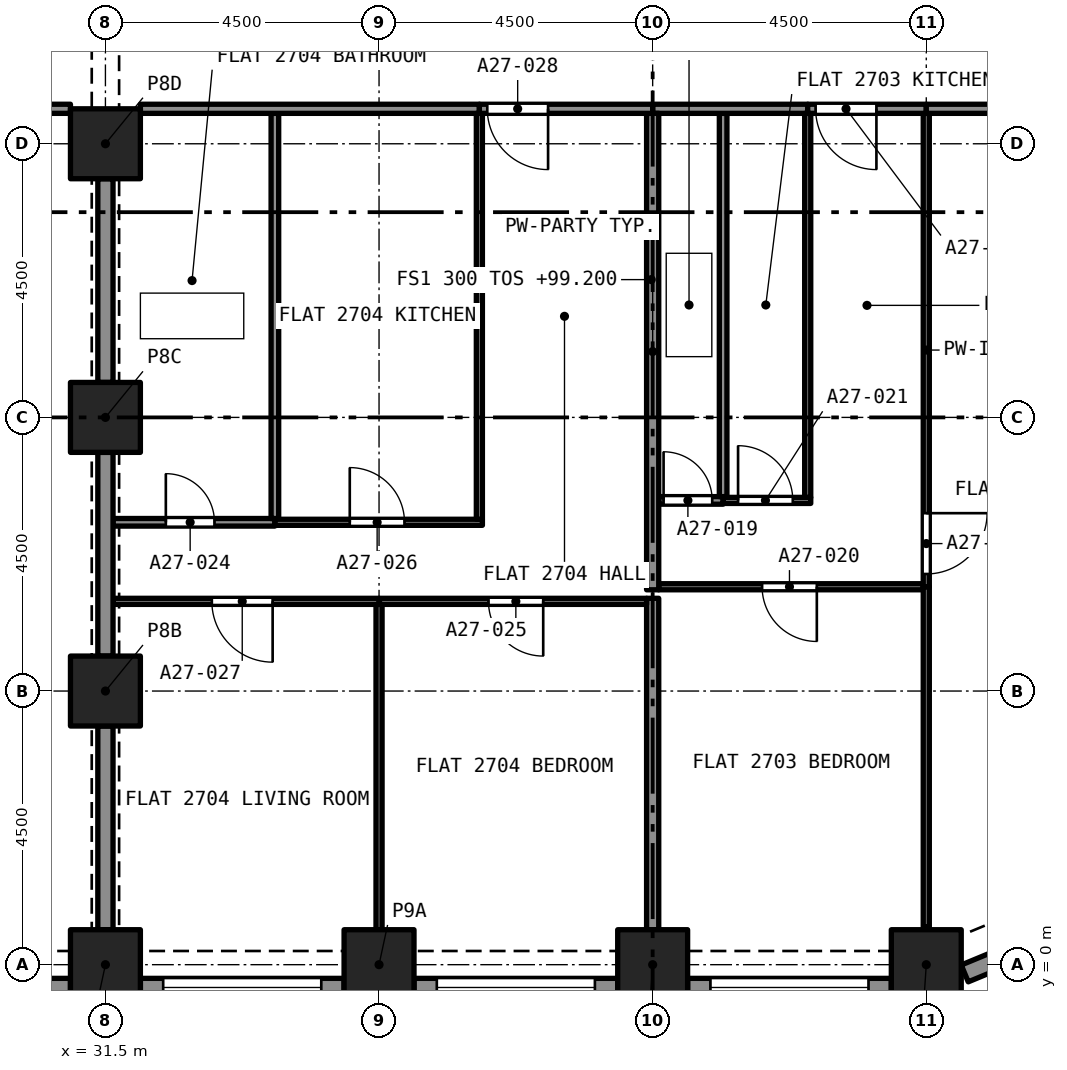
"""IFC4 building model, lengths in metres.
Left out: names, types, materials, properties, quantities, classifications, styles, units other than length and angle.
Written with IfcOpenShell. Run it as: python <this file> out.ifc"""

import sys

from ifc_helpers import new_model, si_unit, direction, frame, frame_2d, origin, origin_2d, place, context, subcontext, project, spatial, rectangle, extrude, element, fill, save


model = new_model("IFC4")
c1 = context("Model", 3, precision=1e-05, world=origin(), true_north=direction((0.0, 1.0)))
c2 = subcontext(c1, "Body", "Model", "MODEL_VIEW")
j1 = project(units=[si_unit("LENGTHUNIT", "METRE"), si_unit("PLANEANGLEUNIT", "RADIAN")], contexts=[c1])
p1 = place(None, origin())
s1 = spatial("IfcSite", under=j1, at=p1, CompositionType="ELEMENT")
p2 = place(p1, origin())
s2 = spatial("IfcBuilding", under=s1, at=p2, CompositionType="ELEMENT")
p3 = place(p2, frame((0.0, 0.0, 99.2)))
s3 = spatial("IfcBuildingStorey", under=s2, at=p3, CompositionType="ELEMENT", Elevation=99.2)
for number, where, z_axis, x_axis in (
    (1, (31.5, 0.0, 0.0), (0.0, 0.0, 1.0), (1.0, 0.0, 0.0)),
    (2, (36.0, 0.0, 0.0), (0.0, 0.0, 1.0), (1.0, 0.0, 0.0)),
    (3, (40.5, 0.0, 0.0), (0.0, 0.0, 1.0), (1.0, 0.0, 0.0)),
    (4, (45.0, 0.0, 0.0), (0.0, 0.0, 1.0), (1.0, 0.0, 0.0)),
    (5, (31.5, 4.5, 0.0), (0.0, 0.0, 1.0), (1.0, 0.0, 0.0)),
    (6, (31.5, 9.0, 0.0), (0.0, 0.0, 1.0), (1.0, 0.0, 0.0)),
    (7, (31.5, 13.5, 0.0), (0.0, 0.0, 1.0), (1.0, 0.0, 0.0)),
):
    element("IfcColumn", number, at=place(p3, frame(where, z_axis=z_axis, x_axis=x_axis)), inside=s3, PredefinedType="COLUMN", context=c2, shape_type="SweptSolid", body=[
        extrude(rectangle(XDim=1.15, YDim=1.15, at=origin_2d()), origin(), (0.0, 0.0, 1.0), 3.2),
    ])
p4 = place(p3, frame((30.925, -0.375, 0.0), z_axis=(0.0, 0.0, 1.0), x_axis=(-1.0, 0.0, 0.0)))
e8 = element("IfcWall", 8, at=p4, inside=s3, PredefinedType="SOLIDWALL", context=c2, shape_type="SweptSolid", body=[
    extrude(rectangle(XDim=3.35, YDim=0.3, at=frame_2d((1.675, 0.0))), origin(), (0.0, 0.0, 1.0), 3.2),
])
p5 = place(p4, frame((0.375, 0.0, 0.45)))
e9 = element("IfcOpeningElement", 9, at=p5, cuts=e8, PredefinedType="OPENING", context=c2, shape_type="SweptSolid", body=[
    extrude(rectangle(XDim=2.6, YDim=1.95, at=frame_2d((1.3, 0.975))), frame((0.0, 0.16, 0.0), z_axis=(0.0, -1.0, 0.0), x_axis=(1.0, 0.0, 0.0)), (0.0, 0.0, 1.0), 0.32),
])
p6 = place(p3, frame((35.425, -0.375, 0.0), z_axis=(0.0, 0.0, 1.0), x_axis=(-1.0, 0.0, 0.0)))
e10 = element("IfcWall", 10, at=p6, inside=s3, PredefinedType="SOLIDWALL", context=c2, shape_type="SweptSolid", body=[
    extrude(rectangle(XDim=3.35, YDim=0.3, at=frame_2d((1.675, 0.0))), origin(), (0.0, 0.0, 1.0), 3.2),
])
p7 = place(p6, frame((0.375, 0.0, 0.45)))
e11 = element("IfcOpeningElement", 11, at=p7, cuts=e10, PredefinedType="OPENING", context=c2, shape_type="SweptSolid", body=[
    extrude(rectangle(XDim=2.6, YDim=1.95, at=frame_2d((1.3, 0.975))), frame((0.0, 0.16, 0.0), z_axis=(0.0, -1.0, 0.0), x_axis=(1.0, 0.0, 0.0)), (0.0, 0.0, 1.0), 0.32),
])
p8 = place(p3, frame((39.925, -0.375, 0.0), z_axis=(0.0, 0.0, 1.0), x_axis=(-1.0, 0.0, 0.0)))
e12 = element("IfcWall", 12, at=p8, inside=s3, PredefinedType="SOLIDWALL", context=c2, shape_type="SweptSolid", body=[
    extrude(rectangle(XDim=3.35, YDim=0.3, at=frame_2d((1.675, 0.0))), origin(), (0.0, 0.0, 1.0), 3.2),
])
p9 = place(p8, frame((0.375, 0.0, 0.45)))
e13 = element("IfcOpeningElement", 13, at=p9, cuts=e12, PredefinedType="OPENING", context=c2, shape_type="SweptSolid", body=[
    extrude(rectangle(XDim=2.6, YDim=1.95, at=frame_2d((1.3, 0.975))), frame((0.0, 0.16, 0.0), z_axis=(0.0, -1.0, 0.0), x_axis=(1.0, 0.0, 0.0)), (0.0, 0.0, 1.0), 0.32),
])
p10 = place(p3, frame((44.425, -0.375, 0.0), z_axis=(0.0, 0.0, 1.0), x_axis=(-1.0, 0.0, 0.0)))
e14 = element("IfcWall", 14, at=p10, inside=s3, PredefinedType="SOLIDWALL", context=c2, shape_type="SweptSolid", body=[
    extrude(rectangle(XDim=3.35, YDim=0.3, at=frame_2d((1.675, 0.0))), origin(), (0.0, 0.0, 1.0), 3.2),
])
p11 = place(p10, frame((0.375, 0.0, 0.45)))
e15 = element("IfcOpeningElement", 15, at=p11, cuts=e14, PredefinedType="OPENING", context=c2, shape_type="SweptSolid", body=[
    extrude(rectangle(XDim=2.6, YDim=1.95, at=frame_2d((1.3, 0.975))), frame((0.0, 0.16, 0.0), z_axis=(0.0, -1.0, 0.0), x_axis=(1.0, 0.0, 0.0)), (0.0, 0.0, 1.0), 0.32),
])
p12 = place(p3, frame((47.631, 0.684, 0.0), z_axis=(0.0, 0.0, 1.0), x_axis=(-0.923862802911, -0.382723818695, 0.0)))
e16 = element("IfcWall", 16, at=p12, inside=s3, PredefinedType="SOLIDWALL", context=c2, shape_type="SweptSolid", body=[
    extrude(rectangle(XDim=2.164, YDim=0.3, at=frame_2d((1.082, 0.0))), origin(), (0.0, 0.0, 1.0), 3.2),
])
p13 = place(p12, frame((0.271, 0.0, 0.45)))
e17 = element("IfcOpeningElement", 17, at=p13, cuts=e16, PredefinedType="OPENING", context=c2, shape_type="SweptSolid", body=[
    extrude(rectangle(XDim=1.4, YDim=1.95, at=frame_2d((0.7, 0.975))), frame((0.0, 0.16, 0.0), z_axis=(0.0, -1.0, 0.0), x_axis=(1.0, 0.0, 0.0)), (0.0, 0.0, 1.0), 0.32),
])
p14 = place(p3, frame((40.6, 7.635, 0.0), z_axis=(0.0, 0.0, 1.0), x_axis=(1.0, 0.0, 0.0)))
e18 = element("IfcWall", 18, at=p14, inside=s3, PredefinedType="PARTITIONING", context=c2, shape_type="SweptSolid", body=[
    extrude(rectangle(XDim=1.059, YDim=0.125, at=frame_2d((0.53, 0.0))), origin(), (0.0, 0.0, 1.0), 2.9),
])
p15 = place(p14, frame((0.08, 0.0, 0.0)))
e19 = element("IfcOpeningElement", 19, at=p15, cuts=e18, PredefinedType="OPENING", context=c2, shape_type="SweptSolid", body=[
    extrude(rectangle(XDim=0.8, YDim=2.1, at=frame_2d((0.4, 1.05))), frame((0.0, 0.073, 0.0), z_axis=(0.0, -1.0, 0.0), x_axis=(1.0, 0.0, 0.0)), (0.0, 0.0, 1.0), 0.145),
])
p16 = place(p3, frame((41.659, 7.698, 0.0), z_axis=(0.0, 0.0, 1.0), x_axis=(0.0, 1.0, 0.0)))
e20 = element("IfcWall", 20, at=p16, inside=s3, PredefinedType="PARTITIONING", context=c2, shape_type="SweptSolid", body=[
    extrude(rectangle(XDim=6.302, YDim=0.125, at=frame_2d((3.151, 0.0))), origin(), (0.0, 0.0, 1.0), 2.9),
])
p17 = place(p3, frame((40.5, 14.075, 0.0), z_axis=(0.0, 0.0, 1.0), x_axis=(1.0, 0.0, 0.0)))
e21 = element("IfcWall", 21, at=p17, inside=s3, PredefinedType="PARTITIONING", context=c2, shape_type="SweptSolid", body=[
    extrude(rectangle(XDim=2.55, YDim=0.15, at=frame_2d((1.275, 0.0))), origin(), (0.0, 0.0, 1.0), 2.9),
])
p18 = place(p3, frame((44.95, 6.215, 0.0), z_axis=(0.0, 0.0, 1.0), x_axis=(-1.0, 0.0, 0.0)))
e22 = element("IfcWall", 22, at=p18, inside=s3, PredefinedType="PARTITIONING", context=c2, shape_type="SweptSolid", body=[
    extrude(rectangle(XDim=4.35, YDim=0.1, at=frame_2d((2.175, 0.0))), origin(), (0.0, 0.0, 1.0), 2.9),
])
p19 = place(p18, frame((1.75, 0.0, 0.0)))
e23 = element("IfcOpeningElement", 23, at=p19, cuts=e22, PredefinedType="OPENING", context=c2, shape_type="SweptSolid", body=[
    extrude(rectangle(XDim=0.9, YDim=2.1, at=frame_2d((0.45, 1.05))), frame((0.0, 0.06, 0.0), z_axis=(0.0, -1.0, 0.0), x_axis=(1.0, 0.0, 0.0)), (0.0, 0.0, 1.0), 0.12),
])
p20 = place(p3, frame((45.0, 0.622, 0.0), z_axis=(0.0, 0.0, 1.0), x_axis=(0.0, 1.0, 0.0)))
e24 = element("IfcWall", 24, at=p20, inside=s3, PredefinedType="PARTITIONING", context=c2, shape_type="SweptSolid", body=[
    extrude(rectangle(XDim=5.593, YDim=0.1, at=frame_2d((2.796, 0.0))), origin(), (0.0, 0.0, 1.0), 2.9),
])
p21 = place(p3, frame((40.5, 0.575, 0.0), z_axis=(0.0, 0.0, 1.0), x_axis=(0.0, 1.0, 0.0)))
e25 = element("IfcWall", 25, at=p21, inside=s3, PredefinedType="PARTITIONING", context=c2, shape_type="SweptSolid", body=[
    extrude(rectangle(XDim=5.45, YDim=0.2, at=frame_2d((2.725, 0.0))), origin(), (0.0, 0.0, 1.0), 2.9),
])
p22 = place(p3, frame((41.659, 7.635, 0.0), z_axis=(0.0, 0.0, 1.0), x_axis=(1.0, 0.0, 0.0)))
e26 = element("IfcWall", 26, at=p22, inside=s3, PredefinedType="PARTITIONING", context=c2, shape_type="SweptSolid", body=[
    extrude(rectangle(XDim=1.441, YDim=0.1, at=frame_2d((0.72, 0.0))), origin(), (0.0, 0.0, 1.0), 2.9),
])
p23 = place(p22, frame((0.246, 0.0, 0.0)))
e27 = element("IfcOpeningElement", 27, at=p23, cuts=e26, PredefinedType="OPENING", context=c2, shape_type="SweptSolid", body=[
    extrude(rectangle(XDim=0.9, YDim=2.1, at=frame_2d((0.45, 1.05))), frame((0.0, 0.06, 0.0), z_axis=(0.0, -1.0, 0.0), x_axis=(1.0, 0.0, 0.0)), (0.0, 0.0, 1.0), 0.12),
])
p24 = place(p3, frame((43.05, 7.685, 0.0), z_axis=(0.0, 0.0, 1.0), x_axis=(0.0, 1.0, 0.0)))
e28 = element("IfcWall", 28, at=p24, inside=s3, PredefinedType="PARTITIONING", context=c2, shape_type="SweptSolid", body=[
    extrude(rectangle(XDim=6.315, YDim=0.1, at=frame_2d((3.157, 0.0))), origin(), (0.0, 0.0, 1.0), 2.9),
])
p25 = place(p3, frame((45.0, 14.0, 0.0), z_axis=(0.0, 0.0, 1.0), x_axis=(0.0, -1.0, 0.0)))
e29 = element("IfcWall", 29, at=p25, inside=s3, PredefinedType="PARTITIONING", context=c2, shape_type="SweptSolid", body=[
    extrude(rectangle(XDim=7.785, YDim=0.1, at=frame_2d((3.893, 0.0))), origin(), (0.0, 0.0, 1.0), 2.9),
])
p26 = place(p25, frame((6.575, 0.0, 0.0)))
e30 = element("IfcOpeningElement", 30, at=p26, cuts=e29, PredefinedType="OPENING", context=c2, shape_type="SweptSolid", body=[
    extrude(rectangle(XDim=1.0, YDim=2.1, at=frame_2d((0.5, 1.05))), frame((0.0, 0.06, 0.0), z_axis=(0.0, -1.0, 0.0), x_axis=(1.0, 0.0, 0.0)), (0.0, 0.0, 1.0), 0.12),
])
p27 = place(p3, frame((40.5, 6.165, 0.0), z_axis=(0.0, 0.0, 1.0), x_axis=(0.0, 1.0, 0.0)))
e31 = element("IfcWall", 31, at=p27, inside=s3, PredefinedType="PARTITIONING", context=c2, shape_type="SweptSolid", body=[
    extrude(rectangle(XDim=7.835, YDim=0.2, at=frame_2d((3.917, 0.0))), origin(), (0.0, 0.0, 1.0), 2.9),
])
p28 = place(p3, frame((45.0, 14.075, 0.0), z_axis=(0.0, 0.0, 1.0), x_axis=(-1.0, 0.0, 0.0)))
e32 = element("IfcWall", 32, at=p28, inside=s3, PredefinedType="PARTITIONING", context=c2, shape_type="SweptSolid", body=[
    extrude(rectangle(XDim=1.95, YDim=0.15, at=frame_2d((0.975, 0.0))), origin(), (0.0, 0.0, 1.0), 2.9),
])
p29 = place(p28, frame((0.82, 0.0, 0.0)))
e33 = element("IfcOpeningElement", 33, at=p29, cuts=e32, PredefinedType="OPENING", context=c2, shape_type="SweptSolid", body=[
    extrude(rectangle(XDim=1.0, YDim=2.1, at=frame_2d((0.5, 1.05))), frame((0.0, 0.085, 0.0), z_axis=(0.0, -1.0, 0.0), x_axis=(1.0, 0.0, 0.0)), (0.0, 0.0, 1.0), 0.17),
])
p30 = place(p3, frame((45.0, 14.075, 0.0), z_axis=(0.0, 0.0, 1.0), x_axis=(1.0, 0.0, 0.0)))
e34 = element("IfcWall", 34, at=p30, inside=s3, PredefinedType="PARTITIONING", context=c2, shape_type="SweptSolid", body=[
    extrude(rectangle(XDim=3.925, YDim=0.15, at=frame_2d((1.962, 0.0))), origin(), (0.0, 0.0, 1.0), 2.9),
])
p31 = place(p3, frame((31.625, 7.275, 0.0), z_axis=(0.0, 0.0, 1.0), x_axis=(1.0, 0.0, 0.0)))
e35 = element("IfcWall", 35, at=p31, inside=s3, PredefinedType="PARTITIONING", context=c2, shape_type="SweptSolid", body=[
    extrude(rectangle(XDim=2.662, YDim=0.125, at=frame_2d((1.331, 0.0))), origin(), (0.0, 0.0, 1.0), 2.9),
])
p32 = place(p31, frame((0.868, 0.0, 0.0)))
e36 = element("IfcOpeningElement", 36, at=p32, cuts=e35, PredefinedType="OPENING", context=c2, shape_type="SweptSolid", body=[
    extrude(rectangle(XDim=0.8, YDim=2.1, at=frame_2d((0.4, 1.05))), frame((0.0, 0.073, 0.0), z_axis=(0.0, -1.0, 0.0), x_axis=(1.0, 0.0, 0.0)), (0.0, 0.0, 1.0), 0.145),
])
p33 = place(p3, frame((34.287, 7.337, 0.0), z_axis=(0.0, 0.0, 1.0), x_axis=(0.0, 1.0, 0.0)))
e37 = element("IfcWall", 37, at=p33, inside=s3, PredefinedType="PARTITIONING", context=c2, shape_type="SweptSolid", body=[
    extrude(rectangle(XDim=6.663, YDim=0.125, at=frame_2d((3.331, 0.0))), origin(), (0.0, 0.0, 1.0), 2.9),
])
p34 = place(p3, frame((31.5, 9.575, 0.0), z_axis=(0.0, 0.0, 1.0), x_axis=(0.0, 1.0, 0.0)))
e38 = element("IfcWall", 38, at=p34, inside=s3, PredefinedType="PARTITIONING", context=c2, shape_type="SweptSolid", body=[
    extrude(rectangle(XDim=3.35, YDim=0.25, at=frame_2d((1.675, 0.0))), origin(), (0.0, 0.0, 1.0), 2.38),
])
p35 = place(p3, frame((32.075, 14.075, 0.0), z_axis=(0.0, 0.0, 1.0), x_axis=(1.0, 0.0, 0.0)))
e39 = element("IfcWall", 39, at=p35, inside=s3, PredefinedType="PARTITIONING", context=c2, shape_type="SweptSolid", body=[
    extrude(rectangle(XDim=5.575, YDim=0.15, at=frame_2d((2.788, 0.0))), origin(), (0.0, 0.0, 1.0), 2.9),
])
p36 = place(p3, frame((40.4, 5.975, 0.0), z_axis=(0.0, 0.0, 1.0), x_axis=(-1.0, 0.0, 0.0)))
e40 = element("IfcWall", 40, at=p36, inside=s3, PredefinedType="PARTITIONING", context=c2, shape_type="SweptSolid", body=[
    extrude(rectangle(XDim=4.4, YDim=0.1, at=frame_2d((2.2, 0.0))), origin(), (0.0, 0.0, 1.0), 2.9),
])
p37 = place(p36, frame((1.7, 0.0, 0.0)))
e41 = element("IfcOpeningElement", 41, at=p37, cuts=e40, PredefinedType="OPENING", context=c2, shape_type="SweptSolid", body=[
    extrude(rectangle(XDim=0.9, YDim=2.1, at=frame_2d((0.45, 1.05))), frame((0.0, 0.06, 0.0), z_axis=(0.0, -1.0, 0.0), x_axis=(1.0, 0.0, 0.0)), (0.0, 0.0, 1.0), 0.12),
])
p38 = place(p3, frame((36.0, 0.575, 0.0), z_axis=(0.0, 0.0, 1.0), x_axis=(0.0, 1.0, 0.0)))
e42 = element("IfcWall", 42, at=p38, inside=s3, PredefinedType="PARTITIONING", context=c2, shape_type="SweptSolid", body=[
    extrude(rectangle(XDim=5.35, YDim=0.1, at=frame_2d((2.675, 0.0))), origin(), (0.0, 0.0, 1.0), 2.9),
])
p39 = place(p3, frame((34.287, 7.275, 0.0), z_axis=(0.0, 0.0, 1.0), x_axis=(1.0, 0.0, 0.0)))
e43 = element("IfcWall", 43, at=p39, inside=s3, PredefinedType="PARTITIONING", context=c2, shape_type="SweptSolid", body=[
    extrude(rectangle(XDim=3.413, YDim=0.1, at=frame_2d((1.707, 0.0))), origin(), (0.0, 0.0, 1.0), 2.9),
])
p40 = place(p39, frame((1.231, 0.0, 0.0)))
e44 = element("IfcOpeningElement", 44, at=p40, cuts=e43, PredefinedType="OPENING", context=c2, shape_type="SweptSolid", body=[
    extrude(rectangle(XDim=0.9, YDim=2.1, at=frame_2d((0.45, 1.05))), frame((0.0, 0.06, 0.0), z_axis=(0.0, -1.0, 0.0), x_axis=(1.0, 0.0, 0.0)), (0.0, 0.0, 1.0), 0.12),
])
p41 = place(p3, frame((37.65, 7.325, 0.0), z_axis=(0.0, 0.0, 1.0), x_axis=(0.0, 1.0, 0.0)))
e45 = element("IfcWall", 45, at=p41, inside=s3, PredefinedType="PARTITIONING", context=c2, shape_type="SweptSolid", body=[
    extrude(rectangle(XDim=6.675, YDim=0.1, at=frame_2d((3.337, 0.0))), origin(), (0.0, 0.0, 1.0), 2.9),
])
p42 = place(p3, frame((36.0, 5.975, 0.0), z_axis=(0.0, 0.0, 1.0), x_axis=(-1.0, 0.0, 0.0)))
e46 = element("IfcWall", 46, at=p42, inside=s3, PredefinedType="PARTITIONING", context=c2, shape_type="SweptSolid", body=[
    extrude(rectangle(XDim=4.375, YDim=0.1, at=frame_2d((2.188, 0.0))), origin(), (0.0, 0.0, 1.0), 2.9),
])
p43 = place(p42, frame((1.75, 0.0, 0.0)))
e47 = element("IfcOpeningElement", 47, at=p43, cuts=e46, PredefinedType="OPENING", context=c2, shape_type="SweptSolid", body=[
    extrude(rectangle(XDim=1.0, YDim=2.1, at=frame_2d((0.5, 1.05))), frame((0.0, 0.06, 0.0), z_axis=(0.0, -1.0, 0.0), x_axis=(1.0, 0.0, 0.0)), (0.0, 0.0, 1.0), 0.12),
])
p44 = place(p3, frame((40.5, 14.075, 0.0), z_axis=(0.0, 0.0, 1.0), x_axis=(-1.0, 0.0, 0.0)))
e48 = element("IfcWall", 48, at=p44, inside=s3, PredefinedType="PARTITIONING", context=c2, shape_type="SweptSolid", body=[
    extrude(rectangle(XDim=2.85, YDim=0.15, at=frame_2d((1.425, 0.0))), origin(), (0.0, 0.0, 1.0), 2.9),
])
p45 = place(p44, frame((1.72, 0.0, 0.0)))
e49 = element("IfcOpeningElement", 49, at=p45, cuts=e48, PredefinedType="OPENING", context=c2, shape_type="SweptSolid", body=[
    extrude(rectangle(XDim=1.0, YDim=2.1, at=frame_2d((0.5, 1.05))), frame((0.0, 0.085, 0.0), z_axis=(0.0, -1.0, 0.0), x_axis=(1.0, 0.0, 0.0)), (0.0, 0.0, 1.0), 0.17),
])
for number, where, z_axis, x_axis in (
    (50, (31.5, 0.575, 0.0), (0.0, 0.0, 1.0), (0.0, 1.0, 0.0)),
    (51, (31.5, 5.075, 0.0), (0.0, 0.0, 1.0), (0.0, 1.0, 0.0)),
):
    element("IfcWall", number, at=place(p3, frame(where, z_axis=z_axis, x_axis=x_axis)), inside=s3, PredefinedType="PARTITIONING", context=c2, shape_type="SweptSolid", body=[
        extrude(rectangle(XDim=3.35, YDim=0.25, at=frame_2d((1.675, 0.0))), origin(), (0.0, 0.0, 1.0), 2.38),
    ])
p46 = place(p3, frame((30.925, 14.075, 0.0), z_axis=(0.0, 0.0, 1.0), x_axis=(-1.0, 0.0, 0.0)))
e52 = element("IfcWall", 52, at=p46, inside=s3, PredefinedType="PARTITIONING", context=c2, shape_type="SweptSolid", body=[
    extrude(rectangle(XDim=3.925, YDim=0.15, at=frame_2d((1.962, 0.0))), origin(), (0.0, 0.0, 1.0), 2.75),
])
p47 = place(p46, frame((1.175, 0.0, 0.0)))
e53 = element("IfcOpeningElement", 53, at=p47, cuts=e52, PredefinedType="OPENING", context=c2, shape_type="SweptSolid", body=[
    extrude(rectangle(XDim=1.0, YDim=2.1, at=frame_2d((0.5, 1.05))), frame((0.0, 0.085, 0.0), z_axis=(0.0, -1.0, 0.0), x_axis=(1.0, 0.0, 0.0)), (0.0, 0.0, 1.0), 0.17),
])
p48 = place(p7, origin())
e54 = element("IfcWindow", 54, at=p48, inside=s3, PartitioningType="SINGLE_PANEL", PredefinedType="WINDOW", context=c2, shape_type="SweptSolid", body=[
    extrude(rectangle(XDim=2.6, YDim=1.95, at=frame_2d((1.3, 0.975))), frame((0.0, 0.03, 0.0), z_axis=(0.0, -1.0, 0.0), x_axis=(1.0, 0.0, 0.0)), (0.0, 0.0, 1.0), 0.06),
])
fill(e11, e54)
p49 = place(p9, origin())
e55 = element("IfcWindow", 55, at=p49, inside=s3, PartitioningType="SINGLE_PANEL", PredefinedType="WINDOW", context=c2, shape_type="SweptSolid", body=[
    extrude(rectangle(XDim=2.6, YDim=1.95, at=frame_2d((1.3, 0.975))), frame((0.0, 0.03, 0.0), z_axis=(0.0, -1.0, 0.0), x_axis=(1.0, 0.0, 0.0)), (0.0, 0.0, 1.0), 0.06),
])
fill(e13, e55)
p50 = place(p11, origin())
e56 = element("IfcWindow", 56, at=p50, inside=s3, PartitioningType="SINGLE_PANEL", PredefinedType="WINDOW", context=c2, shape_type="SweptSolid", body=[
    extrude(rectangle(XDim=2.6, YDim=1.95, at=frame_2d((1.3, 0.975))), frame((0.0, 0.03, 0.0), z_axis=(0.0, -1.0, 0.0), x_axis=(1.0, 0.0, 0.0)), (0.0, 0.0, 1.0), 0.06),
])
fill(e15, e56)
p51 = place(p15, origin())
e57 = element("IfcDoor", 57, at=p51, inside=s3, OperationType="SINGLE_SWING_LEFT", PredefinedType="DOOR", context=c2, shape_type="SweptSolid", body=[
    extrude(rectangle(XDim=0.8, YDim=2.1, at=frame_2d((0.4, 1.05))), frame((0.0, 0.025, 0.0), z_axis=(0.0, -1.0, 0.0), x_axis=(1.0, 0.0, 0.0)), (0.0, 0.0, 1.0), 0.05),
])
fill(e19, e57)
p52 = place(p19, origin())
e58 = element("IfcDoor", 58, at=p52, inside=s3, OperationType="SINGLE_SWING_RIGHT", PredefinedType="DOOR", context=c2, shape_type="SweptSolid", body=[
    extrude(rectangle(XDim=0.9, YDim=2.1, at=frame_2d((0.45, 1.05))), frame((0.0, 0.025, 0.0), z_axis=(0.0, -1.0, 0.0), x_axis=(1.0, 0.0, 0.0)), (0.0, 0.0, 1.0), 0.05),
])
fill(e23, e58)
p53 = place(p23, origin())
e59 = element("IfcDoor", 59, at=p53, inside=s3, OperationType="SINGLE_SWING_LEFT", PredefinedType="DOOR", context=c2, shape_type="SweptSolid", body=[
    extrude(rectangle(XDim=0.9, YDim=2.1, at=frame_2d((0.45, 1.05))), frame((0.0, 0.025, 0.0), z_axis=(0.0, -1.0, 0.0), x_axis=(1.0, 0.0, 0.0)), (0.0, 0.0, 1.0), 0.05),
])
fill(e27, e59)
p54 = place(p26, origin())
e60 = element("IfcDoor", 60, at=p54, inside=s3, OperationType="SINGLE_SWING_RIGHT", PredefinedType="DOOR", context=c2, shape_type="SweptSolid", body=[
    extrude(rectangle(XDim=1.0, YDim=2.1, at=frame_2d((0.5, 1.05))), frame((0.0, 0.025, 0.0), z_axis=(0.0, -1.0, 0.0), x_axis=(1.0, 0.0, 0.0)), (0.0, 0.0, 1.0), 0.05),
])
fill(e30, e60)
p55 = place(p29, origin())
e61 = element("IfcDoor", 61, at=p55, inside=s3, OperationType="SINGLE_SWING_RIGHT", PredefinedType="DOOR", context=c2, shape_type="SweptSolid", body=[
    extrude(rectangle(XDim=1.0, YDim=2.1, at=frame_2d((0.5, 1.05))), frame((0.0, 0.025, 0.0), z_axis=(0.0, -1.0, 0.0), x_axis=(1.0, 0.0, 0.0)), (0.0, 0.0, 1.0), 0.05),
])
fill(e33, e61)
p56 = place(p32, origin())
e62 = element("IfcDoor", 62, at=p56, inside=s3, OperationType="SINGLE_SWING_LEFT", PredefinedType="DOOR", context=c2, shape_type="SweptSolid", body=[
    extrude(rectangle(XDim=0.8, YDim=2.1, at=frame_2d((0.4, 1.05))), frame((0.0, 0.025, 0.0), z_axis=(0.0, -1.0, 0.0), x_axis=(1.0, 0.0, 0.0)), (0.0, 0.0, 1.0), 0.05),
])
fill(e36, e62)
p57 = place(p37, origin())
e63 = element("IfcDoor", 63, at=p57, inside=s3, OperationType="SINGLE_SWING_LEFT", PredefinedType="DOOR", context=c2, shape_type="SweptSolid", body=[
    extrude(rectangle(XDim=0.9, YDim=2.1, at=frame_2d((0.45, 1.05))), frame((0.0, 0.025, 0.0), z_axis=(0.0, -1.0, 0.0), x_axis=(1.0, 0.0, 0.0)), (0.0, 0.0, 1.0), 0.05),
])
fill(e41, e63)
p58 = place(p40, origin())
e64 = element("IfcDoor", 64, at=p58, inside=s3, OperationType="SINGLE_SWING_LEFT", PredefinedType="DOOR", context=c2, shape_type="SweptSolid", body=[
    extrude(rectangle(XDim=0.9, YDim=2.1, at=frame_2d((0.45, 1.05))), frame((0.0, 0.025, 0.0), z_axis=(0.0, -1.0, 0.0), x_axis=(1.0, 0.0, 0.0)), (0.0, 0.0, 1.0), 0.05),
])
fill(e44, e64)
p59 = place(p43, origin())
e65 = element("IfcDoor", 65, at=p59, inside=s3, OperationType="SINGLE_SWING_RIGHT", PredefinedType="DOOR", context=c2, shape_type="SweptSolid", body=[
    extrude(rectangle(XDim=1.0, YDim=2.1, at=frame_2d((0.5, 1.05))), frame((0.0, 0.025, 0.0), z_axis=(0.0, -1.0, 0.0), x_axis=(1.0, 0.0, 0.0)), (0.0, 0.0, 1.0), 0.05),
])
fill(e47, e65)
p60 = place(p45, origin())
e66 = element("IfcDoor", 66, at=p60, inside=s3, OperationType="SINGLE_SWING_RIGHT", PredefinedType="DOOR", context=c2, shape_type="SweptSolid", body=[
    extrude(rectangle(XDim=1.0, YDim=2.1, at=frame_2d((0.5, 1.05))), frame((0.0, 0.025, 0.0), z_axis=(0.0, -1.0, 0.0), x_axis=(1.0, 0.0, 0.0)), (0.0, 0.0, 1.0), 0.05),
])
fill(e49, e66)
save(model, sys.argv[1])
